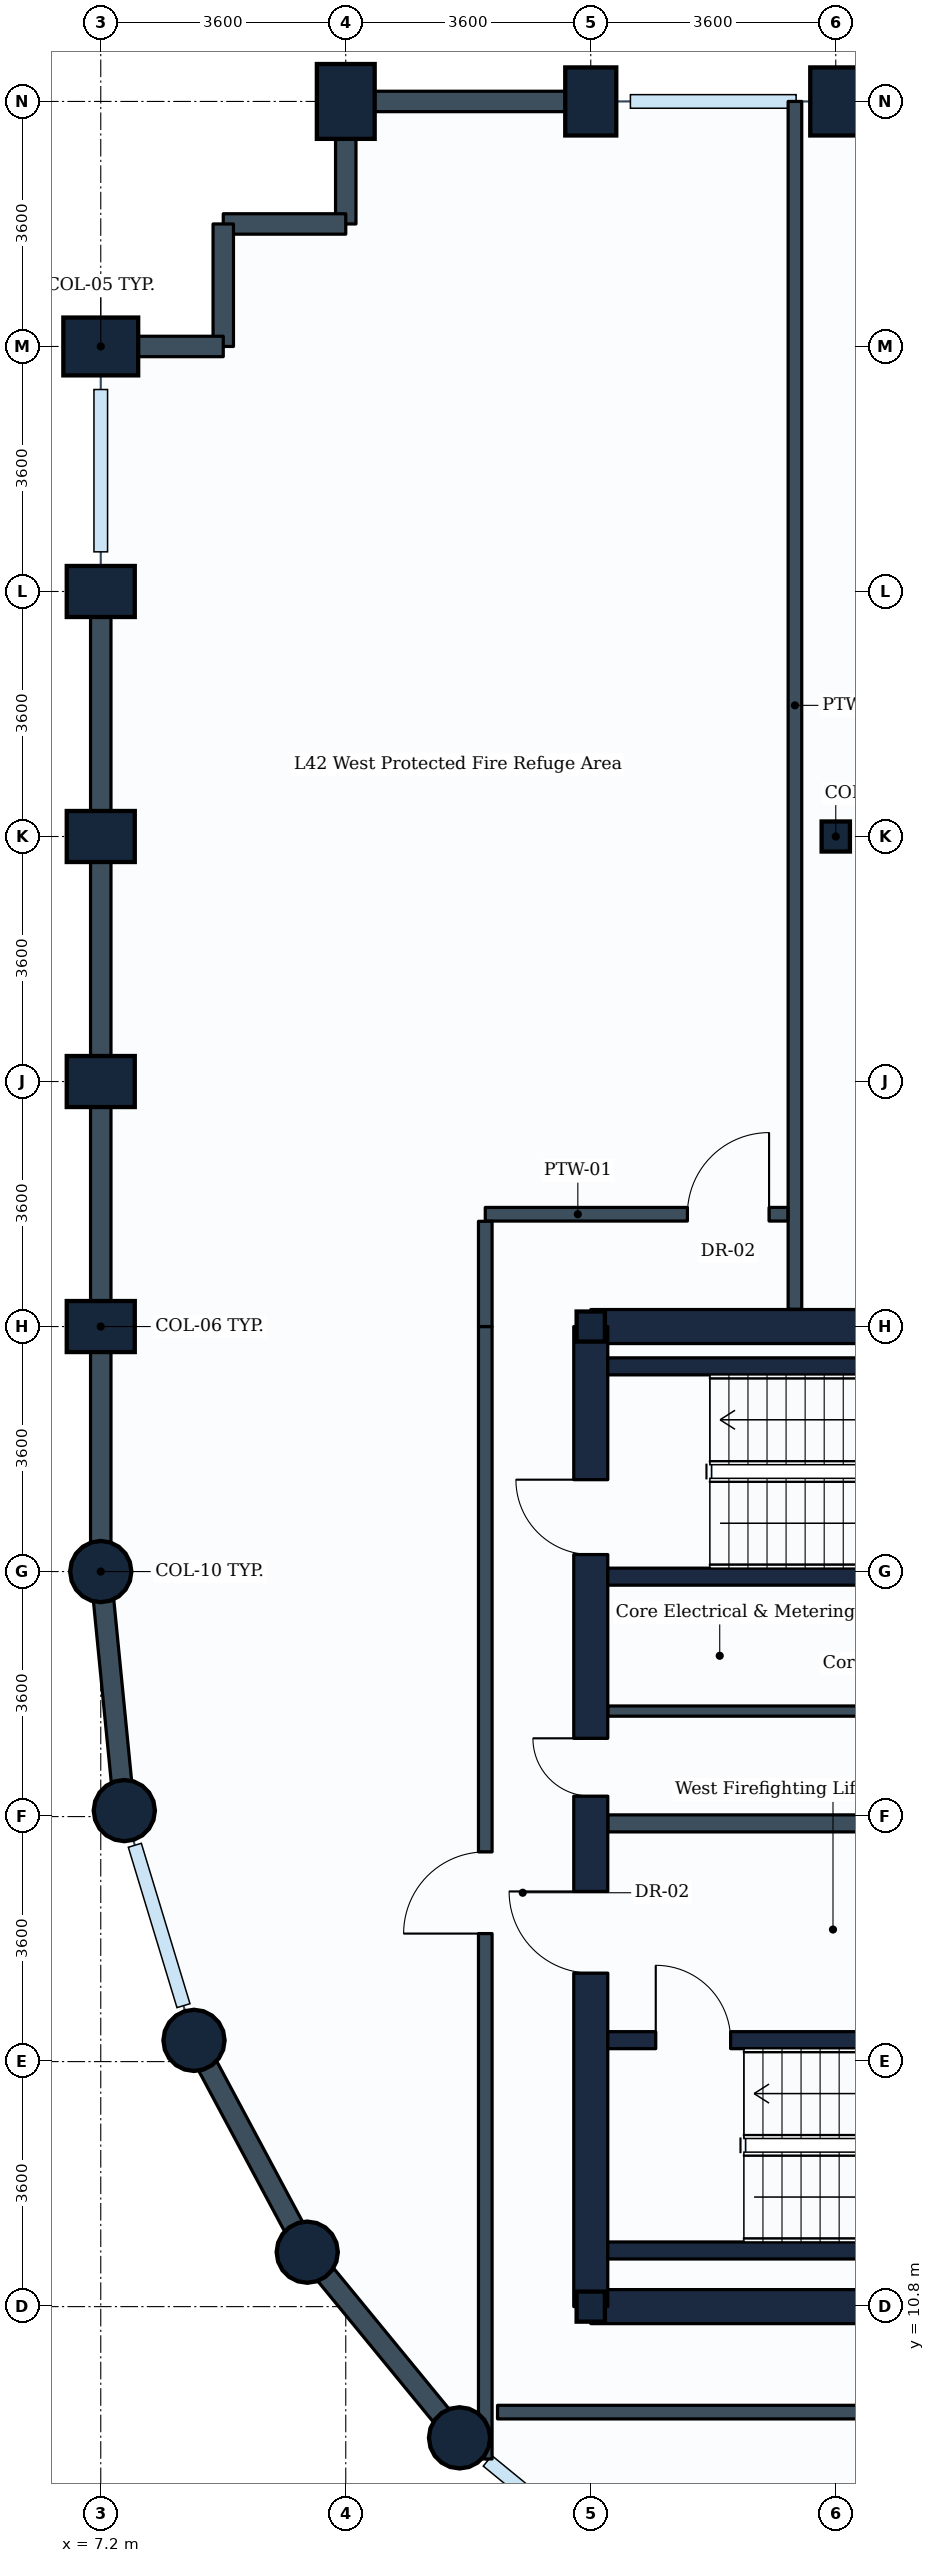
"""IFC4 building model, lengths in metres.
Left out: names, types, materials, properties, quantities, classifications, styles, units other than length and angle.
Written with IfcOpenShell. Run it as: python <this file> out.ifc"""

import sys

from ifc_helpers import new_model, si_unit, direction, frame, frame_2d, origin, origin_2d, place, context, subcontext, project, spatial, rectangle, circle, i_section, extrude, element, fill, save


model = new_model("IFC4")
c1 = context("Model", 3, precision=1e-05, world=origin(), true_north=direction((0.0, 1.0)))
c2 = subcontext(c1, "Body", "Model", "MODEL_VIEW")
j1 = project(units=[si_unit("LENGTHUNIT", "METRE"), si_unit("PLANEANGLEUNIT", "RADIAN")], contexts=[c1])
p1 = place(None, origin())
s1 = spatial("IfcSite", under=j1, at=p1, CompositionType="ELEMENT")
p2 = place(p1, origin())
s2 = spatial("IfcBuilding", under=s1, at=p2, CompositionType="ELEMENT")
p3 = place(p2, frame((0.0, 0.0, 169.4)))
s3 = spatial("IfcBuildingStorey", under=s2, at=p3, CompositionType="ELEMENT", Elevation=169.4)
p4 = place(p3, frame((7.2, 21.6, 0.0), z_axis=(0.0, 0.0, 1.0), x_axis=(1.0, 0.0, 0.0)))
e1 = element("IfcColumn", 1, at=p4, inside=s3, PredefinedType="COLUMN", context=c2, shape_type="SweptSolid", body=[
    extrude(circle(Radius=0.45, at=origin_2d()), origin(), (0.0, 0.0, 1.0), 5.4),
])
for number, where, z_axis, x_axis in (
    (2, (7.2, 25.2, 0.0), (0.0, 0.0, 1.0), (0.0, 1.0, 0.0)),
    (3, (7.2, 28.8, 0.0), (0.0, 0.0, 1.0), (0.0, 1.0, 0.0)),
    (4, (7.2, 32.4, 0.0), (0.0, 0.0, 1.0), (0.0, 1.0, 0.0)),
    (5, (7.2, 36.0, 0.0), (0.0, 0.0, 1.0), (0.0, 1.0, 0.0)),
):
    element("IfcColumn", number, at=place(p3, frame(where, z_axis=z_axis, x_axis=x_axis)), inside=s3, PredefinedType="COLUMN", context=c2, shape_type="SweptSolid", body=[
        extrude(rectangle(XDim=0.75, YDim=1.0, at=origin_2d()), origin(), (0.0, 0.0, 1.0), 5.4),
    ])
p5 = place(p3, frame((7.2, 39.6, 0.0), z_axis=(0.0, 0.0, 1.0), x_axis=(0.0, 1.0, 0.0)))
e6 = element("IfcColumn", 6, at=p5, inside=s3, PredefinedType="COLUMN", context=c2, shape_type="SweptSolid", body=[
    extrude(rectangle(XDim=0.85, YDim=1.1, at=origin_2d()), origin(), (0.0, 0.0, 1.0), 5.4),
])
for number, where, z_axis, x_axis in (
    (7, (7.546, 18.088, 0.0), (0.0, 0.0, 1.0), (1.0, 0.0, 0.0)),
    (8, (8.57, 14.712, 0.0), (0.0, 0.0, 1.0), (1.0, 0.0, 0.0)),
    (9, (10.234, 11.6, 0.0), (0.0, 0.0, 1.0), (1.0, 0.0, 0.0)),
):
    element("IfcColumn", number, at=place(p3, frame(where, z_axis=z_axis, x_axis=x_axis)), inside=s3, PredefinedType="COLUMN", context=c2, shape_type="SweptSolid", body=[
        extrude(circle(Radius=0.45, at=origin_2d()), origin(), (0.0, 0.0, 1.0), 5.4),
    ])
p6 = place(p3, frame((10.8, 43.2, 0.0), z_axis=(0.0, 0.0, 1.0), x_axis=(1.0, 0.0, 0.0)))
e10 = element("IfcColumn", 10, at=p6, inside=s3, PredefinedType="COLUMN", context=c2, shape_type="SweptSolid", body=[
    extrude(rectangle(XDim=0.85, YDim=1.1, at=origin_2d()), origin(), (0.0, 0.0, 1.0), 5.4),
])
p7 = place(p3, frame((12.472, 8.872, 0.0), z_axis=(0.0, 0.0, 1.0), x_axis=(1.0, 0.0, 0.0)))
e11 = element("IfcColumn", 11, at=p7, inside=s3, PredefinedType="COLUMN", context=c2, shape_type="SweptSolid", body=[
    extrude(circle(Radius=0.45, at=origin_2d()), origin(), (0.0, 0.0, 1.0), 5.4),
])
for number, where, z_axis, x_axis in (
    (12, (14.4, 10.8, 0.0), (0.0, 0.0, 1.0), (1.0, 0.0, 0.0)),
    (13, (14.4, 25.2, 0.0), (0.0, 0.0, 1.0), (1.0, 0.0, 0.0)),
):
    element("IfcColumn", number, at=place(p3, frame(where, z_axis=z_axis, x_axis=x_axis)), inside=s3, PredefinedType="COLUMN", context=c2, shape_type="SweptSolid", body=[
        extrude(i_section(OverallWidth=0.416, OverallDepth=0.442, WebThickness=0.025, FlangeThickness=0.041, FilletRadius=0.015, at=origin_2d()), origin(), (0.0, 0.0, 1.0), 5.4),
    ])
p8 = place(p3, frame((14.4, 43.2, 0.0), z_axis=(0.0, 0.0, 1.0), x_axis=(1.0, 0.0, 0.0)))
e14 = element("IfcColumn", 14, at=p8, inside=s3, PredefinedType="COLUMN", context=c2, shape_type="SweptSolid", body=[
    extrude(rectangle(XDim=0.75, YDim=1.0, at=origin_2d()), origin(), (0.0, 0.0, 1.0), 5.4),
])
p9 = place(p3, frame((18.0, 32.4, 0.0), z_axis=(0.0, 0.0, 1.0), x_axis=(1.0, 0.0, 0.0)))
e15 = element("IfcColumn", 15, at=p9, inside=s3, PredefinedType="COLUMN", context=c2, shape_type="SweptSolid", body=[
    extrude(i_section(OverallWidth=0.416, OverallDepth=0.442, WebThickness=0.025, FlangeThickness=0.041, FilletRadius=0.015, at=origin_2d()), origin(), (0.0, 0.0, 1.0), 5.4),
])
p10 = place(p3, frame((18.0, 43.2, 0.0), z_axis=(0.0, 0.0, 1.0), x_axis=(1.0, 0.0, 0.0)))
e16 = element("IfcColumn", 16, at=p10, inside=s3, PredefinedType="COLUMN", context=c2, shape_type="SweptSolid", body=[
    extrude(rectangle(XDim=0.75, YDim=1.0, at=origin_2d()), origin(), (0.0, 0.0, 1.0), 5.4),
])
p11 = place(p3, frame((18.0, 43.2, 0.0), z_axis=(0.0, 0.0, 1.0), x_axis=(1.0, 0.0, 0.0)))
e17 = element("IfcWall", 17, at=p11, inside=s3, PredefinedType="STANDARD", context=c2, shape_type="SweptSolid", body=[
    extrude(rectangle(XDim=3.6, YDim=0.3, at=frame_2d((1.8, 0.0))), origin(), (0.0, 0.0, 1.0), 3.58),
])
p12 = place(p3, frame((10.8, 43.2, 0.0), z_axis=(0.0, 0.0, 1.0), x_axis=(1.0, 0.0, 0.0)))
e18 = element("IfcWall", 18, at=p12, inside=s3, PredefinedType="STANDARD", context=c2, shape_type="SweptSolid", body=[
    extrude(rectangle(XDim=3.6, YDim=0.3, at=frame_2d((1.8, 0.0))), origin(), (0.0, 0.0, 1.0), 4.03),
])
p13 = place(p3, frame((10.8, 41.4, 0.0), z_axis=(0.0, 0.0, 1.0), x_axis=(0.0, 1.0, 0.0)))
e19 = element("IfcWall", 19, at=p13, inside=s3, PredefinedType="STANDARD", context=c2, shape_type="SweptSolid", body=[
    extrude(rectangle(XDim=1.8, YDim=0.3, at=frame_2d((0.9, 0.0))), origin(), (0.0, 0.0, 1.0), 4.03),
])
p14 = place(p3, frame((9.0, 41.4, 0.0), z_axis=(0.0, 0.0, 1.0), x_axis=(1.0, 0.0, 0.0)))
e20 = element("IfcWall", 20, at=p14, inside=s3, PredefinedType="STANDARD", context=c2, shape_type="SweptSolid", body=[
    extrude(rectangle(XDim=1.8, YDim=0.3, at=frame_2d((0.9, 0.0))), origin(), (0.0, 0.0, 1.0), 5.065),
])
p15 = place(p3, frame((9.0, 39.6, 0.0), z_axis=(0.0, 0.0, 1.0), x_axis=(0.0, 1.0, 0.0)))
e21 = element("IfcWall", 21, at=p15, inside=s3, PredefinedType="STANDARD", context=c2, shape_type="SweptSolid", body=[
    extrude(rectangle(XDim=1.8, YDim=0.3, at=frame_2d((0.9, 0.0))), origin(), (0.0, 0.0, 1.0), 3.58),
])
p16 = place(p3, frame((7.2, 39.6, 0.0), z_axis=(0.0, 0.0, 1.0), x_axis=(1.0, 0.0, 0.0)))
e22 = element("IfcWall", 22, at=p16, inside=s3, PredefinedType="STANDARD", context=c2, shape_type="SweptSolid", body=[
    extrude(rectangle(XDim=1.8, YDim=0.3, at=frame_2d((0.9, 0.0))), origin(), (0.0, 0.0, 1.0), 3.58),
])
p17 = place(p3, frame((7.2, 32.4, 0.0), z_axis=(0.0, 0.0, 1.0), x_axis=(0.0, 1.0, 0.0)))
e23 = element("IfcWall", 23, at=p17, inside=s3, PredefinedType="STANDARD", context=c2, shape_type="SweptSolid", body=[
    extrude(rectangle(XDim=3.6, YDim=0.3, at=frame_2d((1.8, 0.0))), origin(), (0.0, 0.0, 1.0), 4.53),
])
p18 = place(p3, frame((7.2, 28.8, 0.0), z_axis=(0.0, 0.0, 1.0), x_axis=(0.0, 1.0, 0.0)))
e24 = element("IfcWall", 24, at=p18, inside=s3, PredefinedType="STANDARD", context=c2, shape_type="SweptSolid", body=[
    extrude(rectangle(XDim=3.6, YDim=0.3, at=frame_2d((1.8, 0.0))), origin(), (0.0, 0.0, 1.0), 4.53),
])
p19 = place(p3, frame((7.2, 25.2, 0.0), z_axis=(0.0, 0.0, 1.0), x_axis=(0.0, 1.0, 0.0)))
e25 = element("IfcWall", 25, at=p19, inside=s3, PredefinedType="STANDARD", context=c2, shape_type="SweptSolid", body=[
    extrude(rectangle(XDim=3.6, YDim=0.3, at=frame_2d((1.8, 0.0))), origin(), (0.0, 0.0, 1.0), 4.53),
])
p20 = place(p3, frame((7.2, 21.6, 0.0), z_axis=(0.0, 0.0, 1.0), x_axis=(0.0, 1.0, 0.0)))
e26 = element("IfcWall", 26, at=p20, inside=s3, PredefinedType="STANDARD", context=c2, shape_type="SweptSolid", body=[
    extrude(rectangle(XDim=3.6, YDim=0.3, at=frame_2d((1.8, 0.0))), origin(), (0.0, 0.0, 1.0), 4.53),
])
p21 = place(p3, frame((7.546, 18.088, 0.0), z_axis=(0.0, 0.0, 1.0), x_axis=(-0.09802417461, 0.995184033831, 0.0)))
e27 = element("IfcWall", 27, at=p21, inside=s3, PredefinedType="STANDARD", context=c2, shape_type="SweptSolid", body=[
    extrude(rectangle(XDim=3.529, YDim=0.3, at=frame_2d((1.765, 0.0))), origin(), (0.0, 0.0, 1.0), 4.53),
])
p22 = place(p3, frame((10.234, 11.6, 0.0), z_axis=(0.0, 0.0, 1.0), x_axis=(-0.47151087309, 0.881860247748, 0.0)))
e28 = element("IfcWall", 28, at=p22, inside=s3, PredefinedType="STANDARD", context=c2, shape_type="SweptSolid", body=[
    extrude(rectangle(XDim=3.529, YDim=0.3, at=frame_2d((1.764, 0.0))), origin(), (0.0, 0.0, 1.0), 4.53),
])
p23 = place(p3, frame((12.472, 8.872, 0.0), z_axis=(0.0, 0.0, 1.0), x_axis=(-0.634258295121, 0.773121216285, 0.0)))
e29 = element("IfcWall", 29, at=p23, inside=s3, PredefinedType="STANDARD", context=c2, shape_type="SweptSolid", body=[
    extrude(rectangle(XDim=3.529, YDim=0.3, at=frame_2d((1.764, 0.0))), origin(), (0.0, 0.0, 1.0), 4.53),
])
p24 = place(p3, frame((14.4, 10.8, 0.0), z_axis=(0.0, 0.0, 1.0), x_axis=(1.0, 0.0, 0.0)))
e30 = element("IfcWall", 30, at=p24, inside=s3, PredefinedType="SHEAR", context=c2, shape_type="SweptSolid", body=[
    extrude(rectangle(XDim=18.0, YDim=0.5, at=frame_2d((9.0, 0.0))), origin(), (0.0, 0.0, 1.0), 5.08),
])
p25 = place(p3, frame((14.4, 25.2, 0.0), z_axis=(0.0, 0.0, 1.0), x_axis=(1.0, 0.0, 0.0)))
e31 = element("IfcWall", 31, at=p25, inside=s3, PredefinedType="SHEAR", context=c2, shape_type="SweptSolid", body=[
    extrude(rectangle(XDim=14.4, YDim=0.5, at=frame_2d((7.2, 0.0))), origin(), (0.0, 0.0, 1.0), 5.08),
])
p26 = place(p3, frame((14.4, 10.8, 0.0), z_axis=(0.0, 0.0, 1.0), x_axis=(0.0, 1.0, 0.0)))
e32 = element("IfcWall", 32, at=p26, inside=s3, PredefinedType="SHEAR", context=c2, shape_type="SweptSolid", body=[
    extrude(rectangle(XDim=14.4, YDim=0.5, at=frame_2d((7.2, 0.0))), origin(), (0.0, 0.0, 1.0), 5.08),
])
p27 = place(p26, frame((11.05, 0.0, 0.0)))
e33 = element("IfcOpeningElement", 33, at=p27, cuts=e32, PredefinedType="OPENING", context=c2, shape_type="SweptSolid", body=[
    extrude(rectangle(XDim=1.1, YDim=2.1, at=frame_2d((0.55, 1.05))), frame((0.0, 0.26, 0.0), z_axis=(0.0, -1.0, 0.0), x_axis=(1.0, 0.0, 0.0)), (0.0, 0.0, 1.0), 0.52),
])
p28 = place(p26, frame((4.9, 0.0, 0.0)))
e34 = element("IfcOpeningElement", 34, at=p28, cuts=e32, PredefinedType="OPENING", context=c2, shape_type="SweptSolid", body=[
    extrude(rectangle(XDim=1.2, YDim=2.1, at=frame_2d((0.6, 1.05))), frame((0.0, 0.26, 0.0), z_axis=(0.0, -1.0, 0.0), x_axis=(1.0, 0.0, 0.0)), (0.0, 0.0, 1.0), 0.52),
])
p29 = place(p26, frame((7.5, 0.0, 0.0)))
e35 = element("IfcOpeningElement", 35, at=p29, cuts=e32, PredefinedType="OPENING", context=c2, shape_type="SweptSolid", body=[
    extrude(rectangle(XDim=0.85, YDim=2.1, at=frame_2d((0.425, 1.05))), frame((0.0, 0.26, 0.0), z_axis=(0.0, -1.0, 0.0), x_axis=(1.0, 0.0, 0.0)), (0.0, 0.0, 1.0), 0.52),
])
p30 = place(p3, frame((14.65, 11.625, 0.0), z_axis=(0.0, 0.0, 1.0), x_axis=(1.0, 0.0, 0.0)))
e36 = element("IfcWall", 36, at=p30, inside=s3, PredefinedType="SHEAR", context=c2, shape_type="SweptSolid", body=[
    extrude(rectangle(XDim=8.7, YDim=0.25, at=frame_2d((4.35, 0.0))), origin(), (0.0, 0.0, 1.0), 5.08),
])
p31 = place(p3, frame((14.65, 14.715, 0.0), z_axis=(0.0, 0.0, 1.0), x_axis=(1.0, 0.0, 0.0)))
e37 = element("IfcWall", 37, at=p31, inside=s3, PredefinedType="SHEAR", context=c2, shape_type="SweptSolid", body=[
    extrude(rectangle(XDim=8.7, YDim=0.25, at=frame_2d((4.35, 0.0))), origin(), (0.0, 0.0, 1.0), 5.08),
])
p32 = place(p31, frame((0.705, 0.0, 0.0)))
e38 = element("IfcOpeningElement", 38, at=p32, cuts=e37, PredefinedType="OPENING", context=c2, shape_type="SweptSolid", body=[
    extrude(rectangle(XDim=1.1, YDim=2.1, at=frame_2d((0.55, 1.05))), frame((0.0, 0.135, 0.0), z_axis=(0.0, -1.0, 0.0), x_axis=(1.0, 0.0, 0.0)), (0.0, 0.0, 1.0), 0.27),
])
for number, where, z_axis, x_axis in (
    (39, (14.65, 21.525, 0.0), (0.0, 0.0, 1.0), (1.0, 0.0, 0.0)),
    (40, (14.65, 24.615, 0.0), (0.0, 0.0, 1.0), (1.0, 0.0, 0.0)),
):
    element("IfcWall", number, at=place(p3, frame(where, z_axis=z_axis, x_axis=x_axis)), inside=s3, PredefinedType="SHEAR", context=c2, shape_type="SweptSolid", body=[
        extrude(rectangle(XDim=8.25, YDim=0.25, at=frame_2d((4.125, 0.0))), origin(), (0.0, 0.0, 1.0), 5.08),
    ])
p33 = place(p3, frame((14.65, 17.9, 0.0), z_axis=(0.0, 0.0, 1.0), x_axis=(1.0, 0.0, 0.0)))
e41 = element("IfcWall", 41, at=p33, inside=s3, PredefinedType="PARTITIONING", context=c2, shape_type="SweptSolid", body=[
    extrude(rectangle(XDim=7.15, YDim=0.25, at=frame_2d((3.575, 0.0))), origin(), (0.0, 0.0, 1.0), 5.065),
])
p34 = place(p3, frame((14.65, 19.55, 0.0), z_axis=(0.0, 0.0, 1.0), x_axis=(1.0, 0.0, 0.0)))
e42 = element("IfcWall", 42, at=p34, inside=s3, PredefinedType="PARTITIONING", context=c2, shape_type="SweptSolid", body=[
    extrude(rectangle(XDim=8.0, YDim=0.15, at=frame_2d((4.0, 0.0))), origin(), (0.0, 0.0, 1.0), 5.065),
])
p35 = place(p3, frame((17.4, 25.454, 0.0), z_axis=(0.0, 0.0, 1.0), x_axis=(0.0, 1.0, 0.0)))
e43 = element("IfcWall", 43, at=p35, inside=s3, PredefinedType="PARTITIONING", context=c2, shape_type="SweptSolid", body=[
    extrude(rectangle(XDim=17.746, YDim=0.2, at=frame_2d((8.873, 0.0))), origin(), (0.0, 0.0, 1.0), 3.58),
])
p36 = place(p3, frame((12.85, 8.562, 0.0), z_axis=(0.0, 0.0, 1.0), x_axis=(0.0, 1.0, 0.0)))
e44 = element("IfcWall", 44, at=p36, inside=s3, PredefinedType="PARTITIONING", context=c2, shape_type="SweptSolid", body=[
    extrude(rectangle(XDim=16.638, YDim=0.2, at=frame_2d((8.319, 0.0))), origin(), (0.0, 0.0, 1.0), 4.53),
])
p37 = place(p36, frame((7.719, 0.0, 0.0)))
e45 = element("IfcOpeningElement", 45, at=p37, cuts=e44, PredefinedType="OPENING", context=c2, shape_type="SweptSolid", body=[
    extrude(rectangle(XDim=1.2, YDim=2.1, at=frame_2d((0.6, 1.05))), frame((0.0, 0.11, 0.0), z_axis=(0.0, -1.0, 0.0), x_axis=(1.0, 0.0, 0.0)), (0.0, 0.0, 1.0), 0.22),
])
p38 = place(p3, frame((12.85, 26.85, 0.0), z_axis=(0.0, 0.0, 1.0), x_axis=(1.0, 0.0, 0.0)))
e46 = element("IfcWall", 46, at=p38, inside=s3, PredefinedType="PARTITIONING", context=c2, shape_type="SweptSolid", body=[
    extrude(rectangle(XDim=4.446, YDim=0.2, at=frame_2d((2.223, 0.0))), origin(), (0.0, 0.0, 1.0), 5.065),
])
p39 = place(p38, frame((2.97, 0.0, 0.0)))
e47 = element("IfcOpeningElement", 47, at=p39, cuts=e46, PredefinedType="OPENING", context=c2, shape_type="SweptSolid", body=[
    extrude(rectangle(XDim=1.2, YDim=2.1, at=frame_2d((0.6, 1.05))), frame((0.0, 0.11, 0.0), z_axis=(0.0, -1.0, 0.0), x_axis=(1.0, 0.0, 0.0)), (0.0, 0.0, 1.0), 0.22),
])
p40 = place(p3, frame((12.85, 25.2, 0.0), z_axis=(0.0, 0.0, 1.0), x_axis=(0.0, 1.0, 0.0)))
e48 = element("IfcWall", 48, at=p40, inside=s3, PredefinedType="PARTITIONING", context=c2, shape_type="SweptSolid", body=[
    extrude(rectangle(XDim=1.546, YDim=0.2, at=frame_2d((0.773, 0.0))), origin(), (0.0, 0.0, 1.0), 5.065),
])
p41 = place(p3, frame((13.03, 9.25, 0.0), z_axis=(0.0, 0.0, 1.0), x_axis=(1.0, 0.0, 0.0)))
e49 = element("IfcWall", 49, at=p41, inside=s3, PredefinedType="PARTITIONING", context=c2, shape_type="SweptSolid", body=[
    extrude(rectangle(XDim=21.37, YDim=0.2, at=frame_2d((10.685, 0.0))), origin(), (0.0, 0.0, 1.0), 4.7),
])
p42 = place(p41, frame((11.248, 0.0, 0.0)))
e50 = element("IfcOpeningElement", 50, at=p42, cuts=e49, PredefinedType="OPENING", context=c2, shape_type="SweptSolid", body=[
    extrude(rectangle(XDim=1.2, YDim=2.1, at=frame_2d((0.6, 1.05))), frame((0.0, 0.11, 0.0), z_axis=(0.0, -1.0, 0.0), x_axis=(1.0, 0.0, 0.0)), (0.0, 0.0, 1.0), 0.22),
])
p43 = place(p32, origin())
e51 = element("IfcDoor", 51, at=p43, inside=s3, OperationType="SINGLE_SWING_LEFT", PredefinedType="DOOR", context=c2, shape_type="SweptSolid", body=[
    extrude(rectangle(XDim=1.1, YDim=2.1, at=frame_2d((0.55, 1.05))), frame((0.0, 0.025, 0.0), z_axis=(0.0, -1.0, 0.0), x_axis=(1.0, 0.0, 0.0)), (0.0, 0.0, 1.0), 0.05),
])
fill(e38, e51)
p44 = place(p27, origin())
e52 = element("IfcDoor", 52, at=p44, inside=s3, OperationType="SINGLE_SWING_RIGHT", PredefinedType="DOOR", context=c2, shape_type="SweptSolid", body=[
    extrude(rectangle(XDim=1.1, YDim=2.1, at=frame_2d((0.55, 1.05))), frame((0.0, 0.025, 0.0), z_axis=(0.0, -1.0, 0.0), x_axis=(1.0, 0.0, 0.0)), (0.0, 0.0, 1.0), 0.05),
])
fill(e33, e52)
p45 = place(p28, origin())
e53 = element("IfcDoor", 53, at=p45, inside=s3, OperationType="SINGLE_SWING_RIGHT", PredefinedType="DOOR", context=c2, shape_type="SweptSolid", body=[
    extrude(rectangle(XDim=1.2, YDim=2.1, at=frame_2d((0.6, 1.05))), frame((0.0, 0.025, 0.0), z_axis=(0.0, -1.0, 0.0), x_axis=(1.0, 0.0, 0.0)), (0.0, 0.0, 1.0), 0.05),
])
fill(e34, e53)
p46 = place(p29, origin())
e54 = element("IfcDoor", 54, at=p46, inside=s3, OperationType="SINGLE_SWING_RIGHT", PredefinedType="DOOR", context=c2, shape_type="SweptSolid", body=[
    extrude(rectangle(XDim=0.85, YDim=2.1, at=frame_2d((0.425, 1.05))), frame((0.0, 0.025, 0.0), z_axis=(0.0, -1.0, 0.0), x_axis=(1.0, 0.0, 0.0)), (0.0, 0.0, 1.0), 0.05),
])
fill(e35, e54)
p47 = place(p37, origin())
e55 = element("IfcDoor", 55, at=p47, inside=s3, OperationType="SINGLE_SWING_LEFT", PredefinedType="DOOR", context=c2, shape_type="SweptSolid", body=[
    extrude(rectangle(XDim=1.2, YDim=2.1, at=frame_2d((0.6, 1.05))), frame((0.0, 0.025, 0.0), z_axis=(0.0, -1.0, 0.0), x_axis=(1.0, 0.0, 0.0)), (0.0, 0.0, 1.0), 0.05),
])
fill(e45, e55)
p48 = place(p39, origin())
e56 = element("IfcDoor", 56, at=p48, inside=s3, OperationType="SINGLE_SWING_RIGHT", PredefinedType="DOOR", context=c2, shape_type="SweptSolid", body=[
    extrude(rectangle(XDim=1.2, YDim=2.1, at=frame_2d((0.6, 1.05))), frame((0.0, 0.025, 0.0), z_axis=(0.0, -1.0, 0.0), x_axis=(1.0, 0.0, 0.0)), (0.0, 0.0, 1.0), 0.05),
])
fill(e47, e56)
save(model, sys.argv[1])
